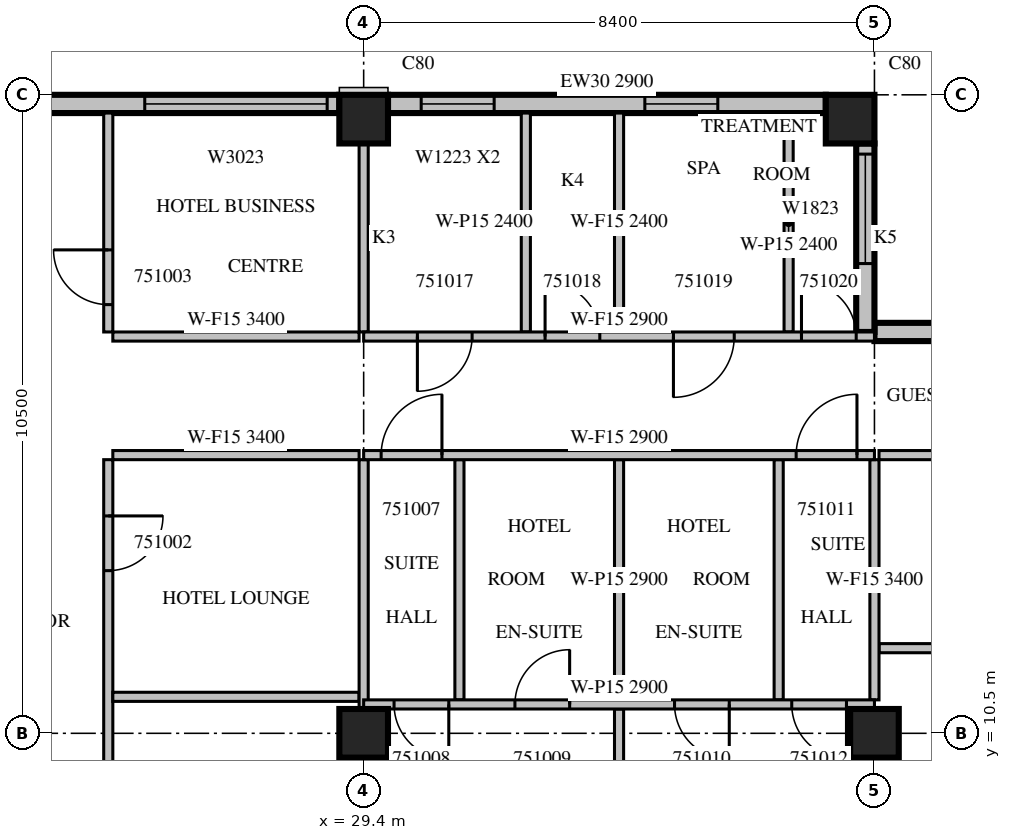
"""IFC4 building model, lengths in metres.
Left out: names, types, materials, properties, quantities, classifications, styles, units other than length and angle.
Written with IfcOpenShell. Run it as: python <this file> out.ifc"""

import sys

from ifc_helpers import new_model, si_unit, direction, frame, frame_2d, origin, origin_2d, place, context, subcontext, project, spatial, rectangle, extrude, source, transform, mapped, element, fill, save


model = new_model("IFC4")
c1 = context("Model", 3, precision=1e-05, world=origin(), true_north=direction((0.0, 1.0)))
c2 = subcontext(c1, "Body", "Model", "MODEL_VIEW")
j1 = project(units=[si_unit("LENGTHUNIT", "METRE"), si_unit("PLANEANGLEUNIT", "RADIAN")], contexts=[c1])
p1 = place(None, origin())
s1 = spatial("IfcSite", under=j1, at=p1, CompositionType="ELEMENT")
p2 = place(p1, origin())
s2 = spatial("IfcBuilding", under=s1, at=p2, CompositionType="ELEMENT")
p3 = place(p2, frame((0.0, 0.0, 227.2)))
s3 = spatial("IfcBuildingStorey", under=s2, at=p3, CompositionType="ELEMENT", Elevation=227.2)
m1 = source(origin(), c2, "Body", "SweptSolid", [
    extrude(rectangle(XDim=0.8, YDim=0.8, at=origin_2d()), origin(), (0.0, 0.0, 1.0), 3.8),
])
for number, where, z_axis, x_axis in (
    (1, (29.4, 10.5, 0.0), (0.0, 0.0, 1.0), (1.0, 0.0, 0.0)),
    (2, (37.8, 10.5, 0.0), (0.0, 0.0, 1.0), (1.0, 0.0, 0.0)),
    (3, (29.4, 20.6, 0.0), (0.0, 0.0, 1.0), (1.0, 0.0, 0.0)),
    (4, (37.4, 20.6, 0.0), (0.0, 0.0, 1.0), (1.0, 0.0, 0.0)),
):
    element("IfcColumn", number, at=place(p3, frame(where, z_axis=z_axis, x_axis=x_axis)), inside=s3, PredefinedType="COLUMN", context=c2, shape_type="MappedRepresentation", body=[
        mapped(m1, transform((0.0, 0.0, 0.0), scale=1.0)),
    ])
m2 = source(origin(), c2, "Body", "SweptSolid", [
    extrude(rectangle(XDim=15.96, YDim=0.3, at=frame_2d((7.98, 0.0))), origin(), (0.0, 0.0, 1.0), 3.4),
])
p4 = place(p3, frame((53.76, 17.1, 0.0), z_axis=(0.0, 0.0, 1.0), x_axis=(-1.0, 0.0, 0.0)))
e5 = element("IfcWall", 5, at=p4, inside=s3, PredefinedType="STANDARD", context=c2, shape_type="MappedRepresentation", body=[
    mapped(m2, transform((0.0, 0.0, 0.0), scale=1.0)),
])
m3 = source(origin(), c2, "Body", "SweptSolid", [
    extrude(rectangle(XDim=3.0, YDim=2.3, at=frame_2d((1.5, 1.15))), frame((0.0, 0.16, 0.0), z_axis=(0.0, -1.0, 0.0), x_axis=(1.0, 0.0, 0.0)), (0.0, 0.0, 1.0), 0.32),
])
p5 = place(p4, frame((0.6, 0.0, 0.6)))
e6 = element("IfcOpeningElement", 6, at=p5, cuts=e5, PredefinedType="OPENING", context=c2, shape_type="MappedRepresentation", body=[
    mapped(m3, transform((0.0, 0.0, 0.0), scale=1.0)),
])
p6 = place(p4, frame((4.8, 0.0, 0.6)))
e7 = element("IfcOpeningElement", 7, at=p6, cuts=e5, PredefinedType="OPENING", context=c2, shape_type="MappedRepresentation", body=[
    mapped(m3, transform((0.0, 0.0, 0.0), scale=1.0)),
])
m4 = source(origin(), c2, "Body", "SweptSolid", [
    extrude(rectangle(XDim=3.6, YDim=2.3, at=frame_2d((1.8, 1.15))), frame((0.0, 0.16, 0.0), z_axis=(0.0, -1.0, 0.0), x_axis=(1.0, 0.0, 0.0)), (0.0, 0.0, 1.0), 0.32),
])
p7 = place(p4, frame((9.54, 0.0, 0.6)))
e8 = element("IfcOpeningElement", 8, at=p7, cuts=e5, PredefinedType="OPENING", context=c2, shape_type="MappedRepresentation", body=[
    mapped(m4, transform((0.0, 0.0, 0.0), scale=1.0)),
])
p8 = place(p3, frame((37.65, 17.1, 0.0), z_axis=(0.0, 0.0, 1.0), x_axis=(0.0, 1.0, 0.0)))
e9 = element("IfcWall", 9, at=p8, inside=s3, PredefinedType="STANDARD", context=c2, shape_type="SweptSolid", body=[
    extrude(rectangle(XDim=3.1, YDim=0.3, at=frame_2d((1.55, 0.0))), origin(), (0.0, 0.0, 1.0), 3.4),
])
m5 = source(origin(), c2, "Body", "SweptSolid", [
    extrude(rectangle(XDim=1.8, YDim=2.3, at=frame_2d((0.9, 1.15))), frame((0.0, 0.16, 0.0), z_axis=(0.0, -1.0, 0.0), x_axis=(1.0, 0.0, 0.0)), (0.0, 0.0, 1.0), 0.32),
])
p9 = place(p8, frame((1.125, 0.0, 0.6)))
e10 = element("IfcOpeningElement", 10, at=p9, cuts=e9, PredefinedType="OPENING", context=c2, shape_type="MappedRepresentation", body=[
    mapped(m5, transform((0.0, 0.0, 0.0), scale=1.0)),
])
p10 = place(p3, frame((37.0, 20.85, 0.0), z_axis=(0.0, 0.0, 1.0), x_axis=(-1.0, 0.0, 0.0)))
e11 = element("IfcWall", 11, at=p10, inside=s3, PredefinedType="STANDARD", context=c2, shape_type="SweptSolid", body=[
    extrude(rectangle(XDim=7.2, YDim=0.3, at=frame_2d((3.6, 0.0))), origin(), (0.0, 0.0, 1.0), 2.9),
])
m6 = source(origin(), c2, "Body", "SweptSolid", [
    extrude(rectangle(XDim=1.2, YDim=2.3, at=frame_2d((0.6, 1.15))), frame((0.0, 0.16, 0.0), z_axis=(0.0, -1.0, 0.0), x_axis=(1.0, 0.0, 0.0)), (0.0, 0.0, 1.0), 0.32),
])
p11 = place(p10, frame((5.454, 0.0, 0.6)))
e12 = element("IfcOpeningElement", 12, at=p11, cuts=e11, PredefinedType="OPENING", context=c2, shape_type="MappedRepresentation", body=[
    mapped(m6, transform((0.0, 0.0, 0.0), scale=1.0)),
])
p12 = place(p10, frame((1.776, 0.0, 0.6)))
e13 = element("IfcOpeningElement", 13, at=p12, cuts=e11, PredefinedType="OPENING", context=c2, shape_type="MappedRepresentation", body=[
    mapped(m6, transform((0.0, 0.0, 0.0), scale=1.0)),
])
p13 = place(p3, frame((29.0, 20.85, 0.0), z_axis=(0.0, 0.0, 1.0), x_axis=(-1.0, 0.0, 0.0)))
e14 = element("IfcWall", 14, at=p13, inside=s3, PredefinedType="STANDARD", context=c2, shape_type="SweptSolid", body=[
    extrude(rectangle(XDim=7.2, YDim=0.3, at=frame_2d((3.6, 0.0))), origin(), (0.0, 0.0, 1.0), 3.4),
])
p14 = place(p13, frame((0.2, 0.0, 0.6)))
e15 = element("IfcOpeningElement", 15, at=p14, cuts=e14, PredefinedType="OPENING", context=c2, shape_type="MappedRepresentation", body=[
    mapped(m3, transform((0.0, 0.0, 0.0), scale=1.0)),
])
p15 = place(p13, frame((5.0, 0.0, 0.6)))
e16 = element("IfcOpeningElement", 16, at=p15, cuts=e14, PredefinedType="OPENING", context=c2, shape_type="MappedRepresentation", body=[
    mapped(m5, transform((0.0, 0.0, 0.0), scale=1.0)),
])
m7 = source(origin(), c2, "Body", "SweptSolid", [
    extrude(rectangle(XDim=11.525, YDim=0.15, at=frame_2d((5.763, 0.0))), origin(), (0.0, 0.0, 1.0), 2.4),
])
p16 = place(p3, frame((25.2, 15.0, 0.0), z_axis=(0.0, 0.0, 1.0), x_axis=(0.0, -1.0, 0.0)))
e17 = element("IfcWall", 17, at=p16, inside=s3, PredefinedType="PARTITIONING", context=c2, shape_type="MappedRepresentation", body=[
    mapped(m7, transform((0.0, 0.0, 0.0), scale=1.0)),
])
m8 = source(origin(), c2, "Body", "SweptSolid", [
    extrude(rectangle(XDim=0.9, YDim=2.1, at=frame_2d((0.45, 1.05))), frame((0.0, 0.085, 0.0), z_axis=(0.0, -1.0, 0.0), x_axis=(1.0, 0.0, 0.0)), (0.0, 0.0, 1.0), 0.17),
])
p17 = place(p16, frame((7.562, 0.0, 0.0)))
e18 = element("IfcOpeningElement", 18, at=p17, cuts=e17, PredefinedType="OPENING", context=c2, shape_type="MappedRepresentation", body=[
    mapped(m8, transform((0.0, 0.0, 0.0), scale=1.0)),
])
p18 = place(p16, frame((0.925, 0.0, 0.0)))
e19 = element("IfcOpeningElement", 19, at=p18, cuts=e17, PredefinedType="OPENING", context=c2, shape_type="MappedRepresentation", body=[
    mapped(m8, transform((0.0, 0.0, 0.0), scale=1.0)),
])
m9 = source(origin(), c2, "Body", "SweptSolid", [
    extrude(rectangle(XDim=3.6, YDim=0.15, at=frame_2d((1.8, 0.0))), origin(), (0.0, 0.0, 1.0), 3.4),
])
p19 = place(p3, frame((25.2, 20.7, 0.0), z_axis=(0.0, 0.0, 1.0), x_axis=(0.0, -1.0, 0.0)))
e20 = element("IfcWall", 20, at=p19, inside=s3, PredefinedType="PARTITIONING", context=c2, shape_type="MappedRepresentation", body=[
    mapped(m9, transform((0.0, 0.0, 0.0), scale=1.0)),
])
p20 = place(p19, frame((2.25, 0.0, 0.0)))
e21 = element("IfcOpeningElement", 21, at=p20, cuts=e20, PredefinedType="OPENING", context=c2, shape_type="MappedRepresentation", body=[
    mapped(m8, transform((0.0, 0.0, 0.0), scale=1.0)),
])
m10 = source(origin(), c2, "Body", "SweptSolid", [
    extrude(rectangle(XDim=4.05, YDim=0.15, at=frame_2d((2.025, 0.0))), origin(), (0.0, 0.0, 1.0), 3.4),
])
for number, where, z_axis, x_axis in (
    (22, (29.325, 11.1, 0.0), (0.0, 0.0, 1.0), (-1.0, 0.0, 0.0)),
    (23, (29.325, 15.075, 0.0), (0.0, 0.0, 1.0), (-1.0, 0.0, 0.0)),
    (24, (25.275, 17.025, 0.0), (0.0, 0.0, 1.0), (1.0, 0.0, 0.0)),
):
    element("IfcWall", number, at=place(p3, frame(where, z_axis=z_axis, x_axis=x_axis)), inside=s3, PredefinedType="PARTITIONING", context=c2, shape_type="MappedRepresentation", body=[
        mapped(m10, transform((0.0, 0.0, 0.0), scale=1.0)),
    ])
p21 = place(p3, frame((29.4, 3.475, 0.0), z_axis=(0.0, 0.0, 1.0), x_axis=(0.0, 1.0, 0.0)))
e25 = element("IfcWall", 25, at=p21, inside=s3, PredefinedType="PARTITIONING", context=c2, shape_type="SweptSolid", body=[
    extrude(rectangle(XDim=6.626, YDim=0.15, at=frame_2d((3.313, 0.0))), origin(), (0.0, 0.0, 1.0), 3.4),
])
p22 = place(p3, frame((29.4, 10.899, 0.0), z_axis=(0.0, 0.0, 1.0), x_axis=(0.0, 1.0, 0.0)))
e26 = element("IfcWall", 26, at=p22, inside=s3, PredefinedType="PARTITIONING", context=c2, shape_type="SweptSolid", body=[
    extrude(rectangle(XDim=4.101, YDim=0.15, at=frame_2d((2.05, 0.0))), origin(), (0.0, 0.0, 1.0), 3.4),
])
p23 = place(p3, frame((29.4, 17.1, 0.0), z_axis=(0.0, 0.0, 1.0), x_axis=(0.0, 1.0, 0.0)))
e27 = element("IfcWall", 27, at=p23, inside=s3, PredefinedType="PARTITIONING", context=c2, shape_type="SweptSolid", body=[
    extrude(rectangle(XDim=3.101, YDim=0.15, at=frame_2d((1.55, 0.0))), origin(), (0.0, 0.0, 1.0), 3.4),
])
m11 = source(origin(), c2, "Body", "SweptSolid", [
    extrude(rectangle(XDim=6.45, YDim=0.15, at=frame_2d((3.225, 0.0))), origin(), (0.0, 0.0, 1.0), 3.4),
])
p24 = place(p3, frame((37.875, 11.9, 0.0), z_axis=(0.0, 0.0, 1.0), x_axis=(1.0, 0.0, 0.0)))
e28 = element("IfcWall", 28, at=p24, inside=s3, PredefinedType="PARTITIONING", context=c2, shape_type="MappedRepresentation", body=[
    mapped(m11, transform((0.0, 0.0, 0.0), scale=1.0)),
])
p25 = place(p3, frame((44.325, 15.075, 0.0), z_axis=(0.0, 0.0, 1.0), x_axis=(-1.0, 0.0, 0.0)))
e29 = element("IfcWall", 29, at=p25, inside=s3, PredefinedType="PARTITIONING", context=c2, shape_type="MappedRepresentation", body=[
    mapped(m11, transform((0.0, 0.0, 0.0), scale=1.0)),
])
p26 = place(p25, frame((2.812, 0.0, 0.0)))
e30 = element("IfcOpeningElement", 30, at=p26, cuts=e29, PredefinedType="OPENING", context=c2, shape_type="MappedRepresentation", body=[
    mapped(m8, transform((0.0, 0.0, 0.0), scale=1.0)),
])
p27 = place(p3, frame((33.6, 0.3, 0.0), z_axis=(0.0, 0.0, 1.0), x_axis=(0.0, 1.0, 0.0)))
e31 = element("IfcWall", 31, at=p27, inside=s3, PredefinedType="PARTITIONING", context=c2, shape_type="SweptSolid", body=[
    extrude(rectangle(XDim=10.6, YDim=0.15, at=frame_2d((5.3, 0.0))), origin(), (0.0, 0.0, 1.0), 2.4),
])
p28 = place(p27, frame((6.35, 0.0, 0.0)))
e32 = element("IfcOpeningElement", 32, at=p28, cuts=e31, PredefinedType="OPENING", context=c2, shape_type="MappedRepresentation", body=[
    mapped(m8, transform((0.0, 0.0, 0.0), scale=1.0)),
])
p29 = place(p3, frame((30.975, 11.05, 0.0), z_axis=(0.0, 0.0, 1.0), x_axis=(0.0, 1.0, 0.0)))
e33 = element("IfcWall", 33, at=p29, inside=s3, PredefinedType="PARTITIONING", context=c2, shape_type="SweptSolid", body=[
    extrude(rectangle(XDim=3.95, YDim=0.15, at=frame_2d((1.975, 0.0))), origin(), (0.0, 0.0, 1.0), 3.4),
])
p30 = place(p3, frame((33.6, 11.05, 0.0), z_axis=(0.0, 0.0, 1.0), x_axis=(0.0, 1.0, 0.0)))
e34 = element("IfcWall", 34, at=p30, inside=s3, PredefinedType="PARTITIONING", context=c2, shape_type="SweptSolid", body=[
    extrude(rectangle(XDim=3.95, YDim=0.15, at=frame_2d((1.975, 0.0))), origin(), (0.0, 0.0, 1.0), 2.9),
])
m12 = source(origin(), c2, "Body", "SweptSolid", [
    extrude(rectangle(XDim=3.95, YDim=0.15, at=frame_2d((1.975, 0.0))), origin(), (0.0, 0.0, 1.0), 3.4),
])
p31 = place(p3, frame((36.225, 11.05, 0.0), z_axis=(0.0, 0.0, 1.0), x_axis=(0.0, 1.0, 0.0)))
e35 = element("IfcWall", 35, at=p31, inside=s3, PredefinedType="PARTITIONING", context=c2, shape_type="MappedRepresentation", body=[
    mapped(m12, transform((0.0, 0.0, 0.0), scale=1.0)),
])
p32 = place(p3, frame((37.8, 0.799, 0.0), z_axis=(0.0, 0.0, 1.0), x_axis=(0.0, 1.0, 0.0)))
e36 = element("IfcWall", 36, at=p32, inside=s3, PredefinedType="PARTITIONING", context=c2, shape_type="SweptSolid", body=[
    extrude(rectangle(XDim=9.302, YDim=0.15, at=frame_2d((4.651, 0.0))), origin(), (0.0, 0.0, 1.0), 3.4),
])
p33 = place(p3, frame((37.8, 11.05, 0.0), z_axis=(0.0, 0.0, 1.0), x_axis=(0.0, 1.0, 0.0)))
e37 = element("IfcWall", 37, at=p33, inside=s3, PredefinedType="PARTITIONING", context=c2, shape_type="MappedRepresentation", body=[
    mapped(m12, transform((0.0, 0.0, 0.0), scale=1.0)),
])
m13 = source(origin(), c2, "Body", "SweptSolid", [
    extrude(rectangle(XDim=8.4, YDim=0.15, at=frame_2d((4.2, 0.0))), origin(), (0.0, 0.0, 1.0), 2.9),
])
p34 = place(p3, frame((37.8, 10.975, 0.0), z_axis=(0.0, 0.0, 1.0), x_axis=(-1.0, 0.0, 0.0)))
e38 = element("IfcWall", 38, at=p34, inside=s3, PredefinedType="PARTITIONING", context=c2, shape_type="MappedRepresentation", body=[
    mapped(m13, transform((0.0, 0.0, 0.0), scale=1.0)),
])
p35 = place(p34, frame((7.0, 0.0, 0.0)))
e39 = element("IfcOpeningElement", 39, at=p35, cuts=e38, PredefinedType="OPENING", context=c2, shape_type="MappedRepresentation", body=[
    mapped(m8, transform((0.0, 0.0, 0.0), scale=1.0)),
])
p36 = place(p34, frame((5.013, 0.0, 0.0)))
e40 = element("IfcOpeningElement", 40, at=p36, cuts=e38, PredefinedType="OPENING", context=c2, shape_type="MappedRepresentation", body=[
    mapped(m8, transform((0.0, 0.0, 0.0), scale=1.0)),
])
p37 = place(p34, frame((2.388, 0.0, 0.0)))
e41 = element("IfcOpeningElement", 41, at=p37, cuts=e38, PredefinedType="OPENING", context=c2, shape_type="MappedRepresentation", body=[
    mapped(m8, transform((0.0, 0.0, 0.0), scale=1.0)),
])
p38 = place(p34, frame((0.46, 0.0, 0.0)))
e42 = element("IfcOpeningElement", 42, at=p38, cuts=e38, PredefinedType="OPENING", context=c2, shape_type="MappedRepresentation", body=[
    mapped(m8, transform((0.0, 0.0, 0.0), scale=1.0)),
])
m14 = source(origin(), c2, "Body", "SweptSolid", [
    extrude(rectangle(XDim=3.6, YDim=0.15, at=frame_2d((1.8, 0.0))), origin(), (0.0, 0.0, 1.0), 2.4),
])
for number, where, z_axis, x_axis in (
    (43, (32.067, 20.7, 0.0), (0.0, 0.0, 1.0), (0.0, -1.0, 0.0)),
    (44, (36.389, 20.7, 0.0), (0.0, 0.0, 1.0), (0.0, -1.0, 0.0)),
    (45, (33.6, 17.1, 0.0), (0.0, 0.0, 1.0), (0.0, 1.0, 0.0)),
):
    element("IfcWall", number, at=place(p3, frame(where, z_axis=z_axis, x_axis=x_axis)), inside=s3, PredefinedType="PARTITIONING", context=c2, shape_type="MappedRepresentation", body=[
        mapped(m14, transform((0.0, 0.0, 0.0), scale=1.0)),
    ])
p39 = place(p3, frame((37.8, 15.075, 0.0), z_axis=(0.0, 0.0, 1.0), x_axis=(-1.0, 0.0, 0.0)))
e46 = element("IfcWall", 46, at=p39, inside=s3, PredefinedType="PARTITIONING", context=c2, shape_type="MappedRepresentation", body=[
    mapped(m13, transform((0.0, 0.0, 0.0), scale=1.0)),
])
m15 = source(origin(), c2, "Body", "SweptSolid", [
    extrude(rectangle(XDim=1.0, YDim=2.1, at=frame_2d((0.5, 1.05))), frame((0.0, 0.085, 0.0), z_axis=(0.0, -1.0, 0.0), x_axis=(1.0, 0.0, 0.0)), (0.0, 0.0, 1.0), 0.17),
])
p40 = place(p39, frame((7.112, 0.0, 0.0)))
e47 = element("IfcOpeningElement", 47, at=p40, cuts=e46, PredefinedType="OPENING", context=c2, shape_type="MappedRepresentation", body=[
    mapped(m15, transform((0.0, 0.0, 0.0), scale=1.0)),
])
p41 = place(p39, frame((0.287, 0.0, 0.0)))
e48 = element("IfcOpeningElement", 48, at=p41, cuts=e46, PredefinedType="OPENING", context=c2, shape_type="MappedRepresentation", body=[
    mapped(m15, transform((0.0, 0.0, 0.0), scale=1.0)),
])
p42 = place(p3, frame((29.4, 17.025, 0.0), z_axis=(0.0, 0.0, 1.0), x_axis=(1.0, 0.0, 0.0)))
e49 = element("IfcWall", 49, at=p42, inside=s3, PredefinedType="PARTITIONING", context=c2, shape_type="MappedRepresentation", body=[
    mapped(m13, transform((0.0, 0.0, 0.0), scale=1.0)),
])
p43 = place(p42, frame((0.883, 0.0, 0.0)))
e50 = element("IfcOpeningElement", 50, at=p43, cuts=e49, PredefinedType="OPENING", context=c2, shape_type="MappedRepresentation", body=[
    mapped(m8, transform((0.0, 0.0, 0.0), scale=1.0)),
])
p44 = place(p42, frame((2.983, 0.0, 0.0)))
e51 = element("IfcOpeningElement", 51, at=p44, cuts=e49, PredefinedType="OPENING", context=c2, shape_type="MappedRepresentation", body=[
    mapped(m8, transform((0.0, 0.0, 0.0), scale=1.0)),
])
p45 = place(p42, frame((5.094, 0.0, 0.0)))
e52 = element("IfcOpeningElement", 52, at=p45, cuts=e49, PredefinedType="OPENING", context=c2, shape_type="MappedRepresentation", body=[
    mapped(m15, transform((0.0, 0.0, 0.0), scale=1.0)),
])
p46 = place(p42, frame((7.2, 0.0, 0.0)))
e53 = element("IfcOpeningElement", 53, at=p46, cuts=e49, PredefinedType="OPENING", context=c2, shape_type="MappedRepresentation", body=[
    mapped(m8, transform((0.0, 0.0, 0.0), scale=1.0)),
])
m16 = source(origin(), c2, "Body", "SweptSolid", [
    extrude(rectangle(XDim=1.8, YDim=2.3, at=frame_2d((0.9, 1.15))), frame((0.0, 0.03, 0.0), z_axis=(0.0, -1.0, 0.0), x_axis=(1.0, 0.0, 0.0)), (0.0, 0.0, 1.0), 0.06),
])
p47 = place(p9, origin())
e54 = element("IfcWindow", 54, at=p47, inside=s3, PartitioningType="SINGLE_PANEL", PredefinedType="WINDOW", context=c2, shape_type="MappedRepresentation", body=[
    mapped(m16, transform((0.0, 0.0, 0.0), scale=1.0)),
])
fill(e10, e54)
m17 = source(origin(), c2, "Body", "SweptSolid", [
    extrude(rectangle(XDim=1.2, YDim=2.3, at=frame_2d((0.6, 1.15))), frame((0.0, 0.03, 0.0), z_axis=(0.0, -1.0, 0.0), x_axis=(1.0, 0.0, 0.0)), (0.0, 0.0, 1.0), 0.06),
])
p48 = place(p11, origin())
e55 = element("IfcWindow", 55, at=p48, inside=s3, PartitioningType="SINGLE_PANEL", PredefinedType="WINDOW", context=c2, shape_type="MappedRepresentation", body=[
    mapped(m17, transform((0.0, 0.0, 0.0), scale=1.0)),
])
fill(e12, e55)
p49 = place(p12, origin())
e56 = element("IfcWindow", 56, at=p49, inside=s3, PartitioningType="SINGLE_PANEL", PredefinedType="WINDOW", context=c2, shape_type="MappedRepresentation", body=[
    mapped(m17, transform((0.0, 0.0, 0.0), scale=1.0)),
])
fill(e13, e56)
m18 = source(origin(), c2, "Body", "SweptSolid", [
    extrude(rectangle(XDim=3.0, YDim=2.3, at=frame_2d((1.5, 1.15))), frame((0.0, 0.03, 0.0), z_axis=(0.0, -1.0, 0.0), x_axis=(1.0, 0.0, 0.0)), (0.0, 0.0, 1.0), 0.06),
])
p50 = place(p14, origin())
e57 = element("IfcWindow", 57, at=p50, inside=s3, PartitioningType="SINGLE_PANEL", PredefinedType="WINDOW", context=c2, shape_type="MappedRepresentation", body=[
    mapped(m18, transform((0.0, 0.0, 0.0), scale=1.0)),
])
fill(e15, e57)
m19 = source(origin(), c2, "Body", "SweptSolid", [
    extrude(rectangle(XDim=0.9, YDim=2.1, at=frame_2d((0.45, 1.05))), frame((0.0, 0.025, 0.0), z_axis=(0.0, -1.0, 0.0), x_axis=(1.0, 0.0, 0.0)), (0.0, 0.0, 1.0), 0.05),
])
p51 = place(p18, origin())
e58 = element("IfcDoor", 58, at=p51, inside=s3, OperationType="SINGLE_SWING_LEFT", PredefinedType="DOOR", context=c2, shape_type="MappedRepresentation", body=[
    mapped(m19, transform((0.0, 0.0, 0.0), scale=1.0)),
])
fill(e19, e58)
p52 = place(p20, origin())
e59 = element("IfcDoor", 59, at=p52, inside=s3, OperationType="SINGLE_SWING_RIGHT", PredefinedType="DOOR", context=c2, shape_type="MappedRepresentation", body=[
    mapped(m19, transform((0.0, 0.0, 0.0), scale=1.0)),
])
fill(e21, e59)
m20 = source(origin(), c2, "Body", "SweptSolid", [
    extrude(rectangle(XDim=1.0, YDim=2.1, at=frame_2d((0.5, 1.05))), frame((0.0, 0.025, 0.0), z_axis=(0.0, -1.0, 0.0), x_axis=(1.0, 0.0, 0.0)), (0.0, 0.0, 1.0), 0.05),
])
p53 = place(p40, origin())
e60 = element("IfcDoor", 60, at=p53, inside=s3, OperationType="SINGLE_SWING_RIGHT", PredefinedType="DOOR", context=c2, shape_type="MappedRepresentation", body=[
    mapped(m20, transform((0.0, 0.0, 0.0), scale=1.0)),
])
fill(e47, e60)
p54 = place(p35, origin())
e61 = element("IfcDoor", 61, at=p54, inside=s3, OperationType="SINGLE_SWING_LEFT", PredefinedType="DOOR", context=c2, shape_type="MappedRepresentation", body=[
    mapped(m19, transform((0.0, 0.0, 0.0), scale=1.0)),
])
fill(e39, e61)
p55 = place(p36, origin())
e62 = element("IfcDoor", 62, at=p55, inside=s3, OperationType="SINGLE_SWING_RIGHT", PredefinedType="DOOR", context=c2, shape_type="MappedRepresentation", body=[
    mapped(m19, transform((0.0, 0.0, 0.0), scale=1.0)),
])
fill(e40, e62)
p56 = place(p37, origin())
e63 = element("IfcDoor", 63, at=p56, inside=s3, OperationType="SINGLE_SWING_LEFT", PredefinedType="DOOR", context=c2, shape_type="MappedRepresentation", body=[
    mapped(m19, transform((0.0, 0.0, 0.0), scale=1.0)),
])
fill(e41, e63)
p57 = place(p41, origin())
e64 = element("IfcDoor", 64, at=p57, inside=s3, OperationType="SINGLE_SWING_RIGHT", PredefinedType="DOOR", context=c2, shape_type="MappedRepresentation", body=[
    mapped(m20, transform((0.0, 0.0, 0.0), scale=1.0)),
])
fill(e48, e64)
p58 = place(p38, origin())
e65 = element("IfcDoor", 65, at=p58, inside=s3, OperationType="SINGLE_SWING_LEFT", PredefinedType="DOOR", context=c2, shape_type="MappedRepresentation", body=[
    mapped(m19, transform((0.0, 0.0, 0.0), scale=1.0)),
])
fill(e42, e65)
p59 = place(p43, origin())
e66 = element("IfcDoor", 66, at=p59, inside=s3, OperationType="SINGLE_SWING_RIGHT", PredefinedType="DOOR", context=c2, shape_type="MappedRepresentation", body=[
    mapped(m19, transform((0.0, 0.0, 0.0), scale=1.0)),
])
fill(e50, e66)
p60 = place(p44, origin())
e67 = element("IfcDoor", 67, at=p60, inside=s3, OperationType="SINGLE_SWING_LEFT", PredefinedType="DOOR", context=c2, shape_type="MappedRepresentation", body=[
    mapped(m19, transform((0.0, 0.0, 0.0), scale=1.0)),
])
fill(e51, e67)
p61 = place(p45, origin())
e68 = element("IfcDoor", 68, at=p61, inside=s3, OperationType="SINGLE_SWING_RIGHT", PredefinedType="DOOR", context=c2, shape_type="MappedRepresentation", body=[
    mapped(m20, transform((0.0, 0.0, 0.0), scale=1.0)),
])
fill(e52, e68)
p62 = place(p46, origin())
e69 = element("IfcDoor", 69, at=p62, inside=s3, OperationType="SINGLE_SWING_LEFT", PredefinedType="DOOR", context=c2, shape_type="MappedRepresentation", body=[
    mapped(m19, transform((0.0, 0.0, 0.0), scale=1.0)),
])
fill(e53, e69)
save(model, sys.argv[1])
